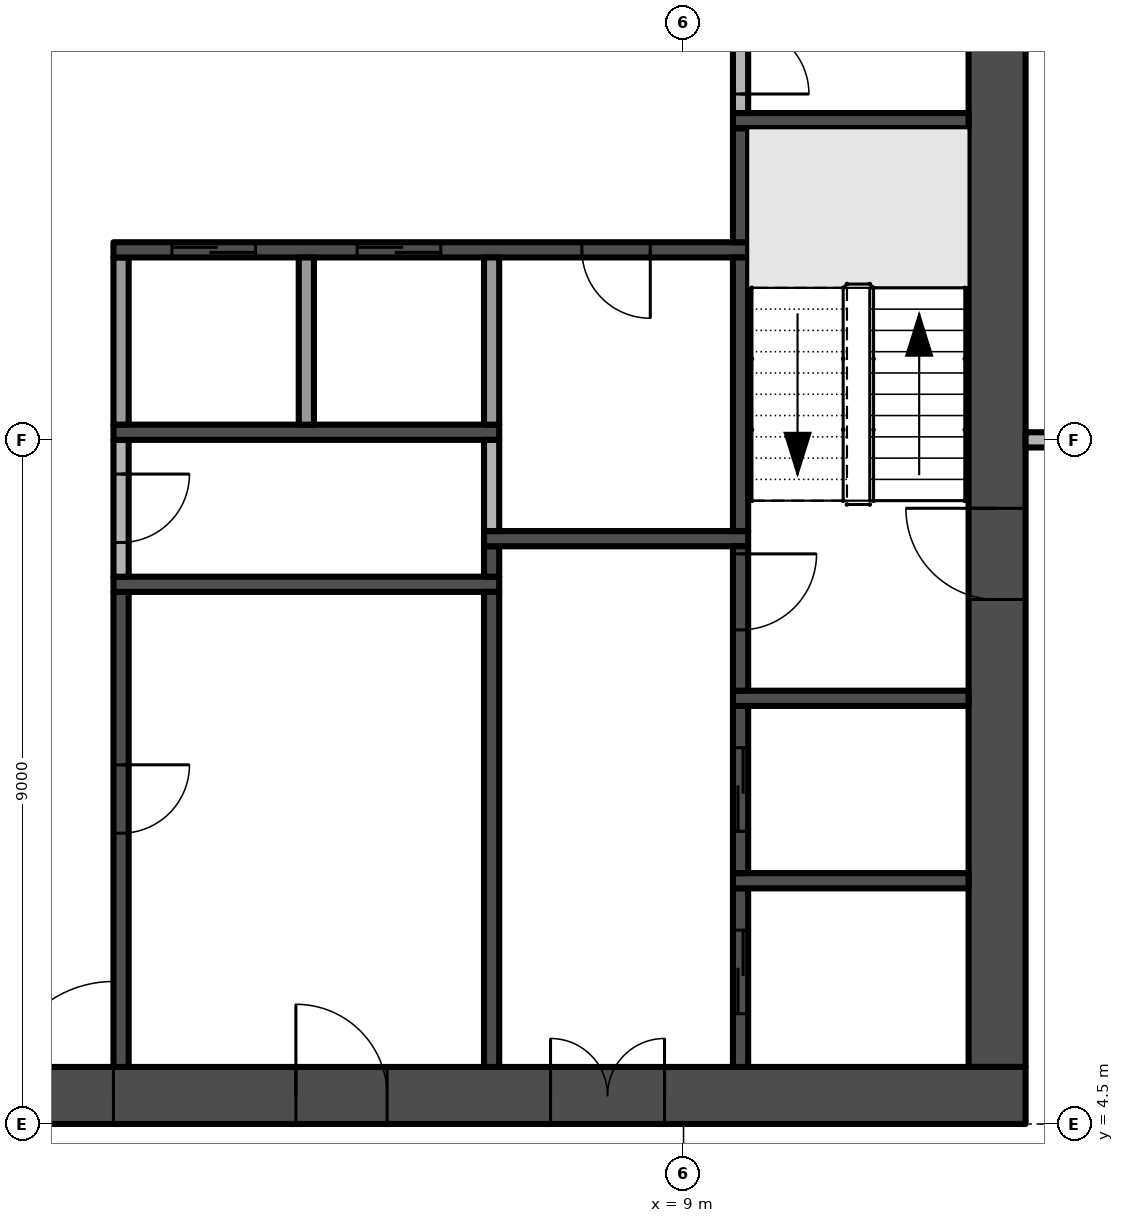
"""IFC4 building model, lengths in metres.
Left out: names, types, materials, properties, quantities, classifications, styles, units other than length and angle.
Written with IfcOpenShell. Run it as: python <this file> out.ifc"""

import sys

from ifc_helpers import new_model, si_unit, direction, frame, frame_2d, origin, place, context, subcontext, project, spatial, rectangle, extrude, element, fill, save


model = new_model("IFC4")
c1 = context("Model", 3, precision=1e-05, world=origin(), true_north=direction((0.0, 1.0)))
c2 = subcontext(c1, "Body", "Model", "MODEL_VIEW")
j1 = project(units=[si_unit("LENGTHUNIT", "METRE"), si_unit("PLANEANGLEUNIT", "RADIAN")], contexts=[c1])
p1 = place(None, origin())
s1 = spatial("IfcSite", under=j1, at=p1, CompositionType="ELEMENT")
p2 = place(p1, origin())
s2 = spatial("IfcBuilding", under=s1, at=p2, CompositionType="ELEMENT")
p3 = place(p2, frame((0.0, 0.0, 151.6)))
s3 = spatial("IfcBuildingStorey", under=s2, at=p3, CompositionType="ELEMENT", Elevation=151.6)
p4 = place(p3, frame((-13.5, 4.875, -0.3), z_axis=(0.0, 0.0, 1.0), x_axis=(1.0, 0.0, 0.0)))
e1 = element("IfcWall", 1, at=p4, inside=s3, PredefinedType="SHEAR", context=c2, shape_type="SweptSolid", body=[
    extrude(rectangle(XDim=27.0, YDim=0.75, at=frame_2d((13.5, 0.0))), origin(), (0.0, 0.0, 1.0), 3.8),
])
p5 = place(p4, frame((12.0, 0.0, 0.3)))
e2 = element("IfcOpeningElement", 2, at=p5, cuts=e1, PredefinedType="OPENING", context=c2, shape_type="SweptSolid", body=[
    extrude(rectangle(XDim=3.0, YDim=2.4, at=frame_2d((1.5, 1.2))), frame((0.0, 0.385, 0.0), z_axis=(0.0, -1.0, 0.0), x_axis=(1.0, 0.0, 0.0)), (0.0, 0.0, 1.0), 0.77),
])
p6 = place(p4, frame((4.9, 0.0, 0.3)))
e3 = element("IfcOpeningElement", 3, at=p6, cuts=e1, PredefinedType="OPENING", context=c2, shape_type="SweptSolid", body=[
    extrude(rectangle(XDim=1.2, YDim=2.2, at=frame_2d((0.6, 1.1))), frame((0.0, 0.385, 0.0), z_axis=(0.0, -1.0, 0.0), x_axis=(1.0, 0.0, 0.0)), (0.0, 0.0, 1.0), 0.77),
])
p7 = place(p4, frame((20.75, 0.0, 0.3)))
e4 = element("IfcOpeningElement", 4, at=p7, cuts=e1, PredefinedType="OPENING", context=c2, shape_type="SweptSolid", body=[
    extrude(rectangle(XDim=1.5, YDim=2.2, at=frame_2d((0.75, 1.1))), frame((0.0, 0.385, 0.0), z_axis=(0.0, -1.0, 0.0), x_axis=(1.0, 0.0, 0.0)), (0.0, 0.0, 1.0), 0.77),
])
p8 = place(p4, frame((17.4, 0.0, 0.3)))
e5 = element("IfcOpeningElement", 5, at=p8, cuts=e1, PredefinedType="OPENING", context=c2, shape_type="SweptSolid", body=[
    extrude(rectangle(XDim=1.2, YDim=2.2, at=frame_2d((0.6, 1.1))), frame((0.0, 0.385, 0.0), z_axis=(0.0, -1.0, 0.0), x_axis=(1.0, 0.0, 0.0)), (0.0, 0.0, 1.0), 0.77),
])
p9 = place(p3, frame((13.125, 5.25, -0.3), z_axis=(0.0, 0.0, 1.0), x_axis=(0.0, 1.0, 0.0)))
e6 = element("IfcWall", 6, at=p9, inside=s3, PredefinedType="SHEAR", context=c2, shape_type="SweptSolid", body=[
    extrude(rectangle(XDim=16.5, YDim=0.75, at=frame_2d((8.25, 0.0))), origin(), (0.0, 0.0, 1.0), 3.8),
])
p10 = place(p9, frame((6.15, 0.0, 0.3)))
e7 = element("IfcOpeningElement", 7, at=p10, cuts=e6, PredefinedType="OPENING", context=c2, shape_type="SweptSolid", body=[
    extrude(rectangle(XDim=1.2, YDim=2.2, at=frame_2d((0.6, 1.1))), frame((0.0, 0.385, 0.0), z_axis=(0.0, -1.0, 0.0), x_axis=(1.0, 0.0, 0.0)), (0.0, 0.0, 1.0), 0.77),
])
p11 = place(p3, frame((1.6, 11.5, 0.0), z_axis=(0.0, 0.0, 1.0), x_axis=(0.0, -1.0, 0.0)))
e8 = element("IfcWall", 8, at=p11, inside=s3, PredefinedType="SHEAR", context=c2, shape_type="SweptSolid", body=[
    extrude(rectangle(XDim=6.25, YDim=0.2, at=frame_2d((3.125, 0.0))), origin(), (0.0, 0.0, 1.0), 3.5),
])
p12 = place(p11, frame((2.275, 0.0, 0.0)))
e9 = element("IfcOpeningElement", 9, at=p12, cuts=e8, PredefinedType="OPENING", context=c2, shape_type="SweptSolid", body=[
    extrude(rectangle(XDim=0.9, YDim=2.1, at=frame_2d((0.45, 1.05))), frame((0.0, 0.11, 0.0), z_axis=(0.0, -1.0, 0.0), x_axis=(1.0, 0.0, 0.0)), (0.0, 0.0, 1.0), 0.22),
])
p13 = place(p3, frame((1.5, 11.6, 0.0), z_axis=(0.0, 0.0, 1.0), x_axis=(1.0, 0.0, 0.0)))
e10 = element("IfcWall", 10, at=p13, inside=s3, PredefinedType="SHEAR", context=c2, shape_type="SweptSolid", body=[
    extrude(rectangle(XDim=5.075, YDim=0.2, at=frame_2d((2.538, 0.0))), origin(), (0.0, 0.0, 1.0), 3.5),
])
p14 = place(p3, frame((1.6, 13.5, 0.0), z_axis=(0.0, 0.0, 1.0), x_axis=(0.0, -1.0, 0.0)))
e11 = element("IfcWall", 11, at=p14, inside=s3, PredefinedType="PARTITIONING", context=c2, shape_type="SweptSolid", body=[
    extrude(rectangle(XDim=1.8, YDim=0.2, at=frame_2d((0.9, 0.0))), origin(), (0.0, 0.0, 1.0), 3.5),
])
p15 = place(p14, frame((0.45, 0.0, 0.0)))
e12 = element("IfcOpeningElement", 12, at=p15, cuts=e11, PredefinedType="OPENING", context=c2, shape_type="SweptSolid", body=[
    extrude(rectangle(XDim=0.9, YDim=2.1, at=frame_2d((0.45, 1.05))), frame((0.0, 0.11, 0.0), z_axis=(0.0, -1.0, 0.0), x_axis=(1.0, 0.0, 0.0)), (0.0, 0.0, 1.0), 0.22),
])
p16 = place(p3, frame((1.5, 13.6, 0.0), z_axis=(0.0, 0.0, 1.0), x_axis=(1.0, 0.0, 0.0)))
e13 = element("IfcWall", 13, at=p16, inside=s3, PredefinedType="SHEAR", context=c2, shape_type="SweptSolid", body=[
    extrude(rectangle(XDim=5.075, YDim=0.2, at=frame_2d((2.538, 0.0))), origin(), (0.0, 0.0, 1.0), 3.5),
])
p17 = place(p3, frame((1.6, 13.7, 0.0), z_axis=(0.0, 0.0, 1.0), x_axis=(0.0, 1.0, 0.0)))
e14 = element("IfcWall", 14, at=p17, inside=s3, PredefinedType="PARTITIONING", context=c2, shape_type="SweptSolid", body=[
    extrude(rectangle(XDim=2.2, YDim=0.2, at=frame_2d((1.1, 0.0))), origin(), (0.0, 0.0, 1.0), 3.5),
])
p18 = place(p3, frame((9.85, 16.0, 0.0), z_axis=(0.0, 0.0, 1.0), x_axis=(-1.0, 0.0, 0.0)))
e15 = element("IfcWall", 15, at=p18, inside=s3, PredefinedType="SHEAR", context=c2, shape_type="SweptSolid", body=[
    extrude(rectangle(XDim=8.35, YDim=0.2, at=frame_2d((4.175, 0.0))), origin(), (0.0, 0.0, 1.0), 3.5),
])
p19 = place(p18, frame((6.481, 0.0, 0.0)))
e16 = element("IfcOpeningElement", 16, at=p19, cuts=e15, PredefinedType="OPENING", context=c2, shape_type="SweptSolid", body=[
    extrude(rectangle(XDim=1.1, YDim=2.1, at=frame_2d((0.55, 1.05))), frame((0.0, 0.11, 0.0), z_axis=(0.0, -1.0, 0.0), x_axis=(1.0, 0.0, 0.0)), (0.0, 0.0, 1.0), 0.22),
])
p20 = place(p18, frame((4.044, 0.0, 0.0)))
e17 = element("IfcOpeningElement", 17, at=p20, cuts=e15, PredefinedType="OPENING", context=c2, shape_type="SweptSolid", body=[
    extrude(rectangle(XDim=1.1, YDim=2.1, at=frame_2d((0.55, 1.05))), frame((0.0, 0.11, 0.0), z_axis=(0.0, -1.0, 0.0), x_axis=(1.0, 0.0, 0.0)), (0.0, 0.0, 1.0), 0.22),
])
p21 = place(p18, frame((1.288, 0.0, 0.0)))
e18 = element("IfcOpeningElement", 18, at=p21, cuts=e15, PredefinedType="OPENING", context=c2, shape_type="SweptSolid", body=[
    extrude(rectangle(XDim=0.9, YDim=2.1, at=frame_2d((0.45, 1.05))), frame((0.0, 0.11, 0.0), z_axis=(0.0, -1.0, 0.0), x_axis=(1.0, 0.0, 0.0)), (0.0, 0.0, 1.0), 0.22),
])
p22 = place(p3, frame((4.037, 13.7, 0.0), z_axis=(0.0, 0.0, 1.0), x_axis=(0.0, 1.0, 0.0)))
e19 = element("IfcWall", 19, at=p22, inside=s3, PredefinedType="PARTITIONING", context=c2, shape_type="SweptSolid", body=[
    extrude(rectangle(XDim=2.2, YDim=0.2, at=frame_2d((1.1, 0.0))), origin(), (0.0, 0.0, 1.0), 3.5),
])
p23 = place(p3, frame((6.475, 5.25, 0.0), z_axis=(0.0, 0.0, 1.0), x_axis=(0.0, 1.0, 0.0)))
e20 = element("IfcWall", 20, at=p23, inside=s3, PredefinedType="SHEAR", context=c2, shape_type="SweptSolid", body=[
    extrude(rectangle(XDim=6.25, YDim=0.2, at=frame_2d((3.125, 0.0))), origin(), (0.0, 0.0, 1.0), 3.5),
])
p24 = place(p3, frame((6.475, 11.7, 0.0), z_axis=(0.0, 0.0, 1.0), x_axis=(0.0, 1.0, 0.0)))
e21 = element("IfcWall", 21, at=p24, inside=s3, PredefinedType="SHEAR", context=c2, shape_type="SweptSolid", body=[
    extrude(rectangle(XDim=0.4, YDim=0.2, at=frame_2d((0.2, 0.0))), origin(), (0.0, 0.0, 1.0), 3.5),
])
p25 = place(p3, frame((6.375, 12.2, 0.0), z_axis=(0.0, 0.0, 1.0), x_axis=(1.0, 0.0, 0.0)))
e22 = element("IfcWall", 22, at=p25, inside=s3, PredefinedType="SHEAR", context=c2, shape_type="SweptSolid", body=[
    extrude(rectangle(XDim=3.475, YDim=0.2, at=frame_2d((1.738, 0.0))), origin(), (0.0, 0.0, 1.0), 3.5),
])
p26 = place(p3, frame((6.475, 12.3, 0.0), z_axis=(0.0, 0.0, 1.0), x_axis=(0.0, 1.0, 0.0)))
e23 = element("IfcWall", 23, at=p26, inside=s3, PredefinedType="PARTITIONING", context=c2, shape_type="SweptSolid", body=[
    extrude(rectangle(XDim=1.2, YDim=0.2, at=frame_2d((0.6, 0.0))), origin(), (0.0, 0.0, 1.0), 3.5),
])
p27 = place(p3, frame((6.475, 13.7, 0.0), z_axis=(0.0, 0.0, 1.0), x_axis=(0.0, 1.0, 0.0)))
e24 = element("IfcWall", 24, at=p27, inside=s3, PredefinedType="PARTITIONING", context=c2, shape_type="SweptSolid", body=[
    extrude(rectangle(XDim=2.2, YDim=0.2, at=frame_2d((1.1, 0.0))), origin(), (0.0, 0.0, 1.0), 3.5),
])
p28 = place(p3, frame((9.75, 5.25, 0.0), z_axis=(0.0, 0.0, 1.0), x_axis=(0.0, 1.0, 0.0)))
e25 = element("IfcWall", 25, at=p28, inside=s3, PredefinedType="SHEAR", context=c2, shape_type="SweptSolid", body=[
    extrude(rectangle(XDim=2.35, YDim=0.2, at=frame_2d((1.175, 0.0))), origin(), (0.0, 0.0, 1.0), 3.5),
])
p29 = place(p28, frame((0.7, 0.0, 0.0)))
e26 = element("IfcOpeningElement", 26, at=p29, cuts=e25, PredefinedType="OPENING", context=c2, shape_type="SweptSolid", body=[
    extrude(rectangle(XDim=1.1, YDim=2.1, at=frame_2d((0.55, 1.05))), frame((0.0, 0.11, 0.0), z_axis=(0.0, -1.0, 0.0), x_axis=(1.0, 0.0, 0.0)), (0.0, 0.0, 1.0), 0.22),
])
p30 = place(p3, frame((9.65, 7.7, 0.0), z_axis=(0.0, 0.0, 1.0), x_axis=(1.0, 0.0, 0.0)))
e27 = element("IfcWall", 27, at=p30, inside=s3, PredefinedType="SHEAR", context=c2, shape_type="SweptSolid", body=[
    extrude(rectangle(XDim=3.1, YDim=0.2, at=frame_2d((1.55, 0.0))), origin(), (0.0, 0.0, 1.0), 3.5),
])
p31 = place(p3, frame((9.75, 7.8, 0.0), z_axis=(0.0, 0.0, 1.0), x_axis=(0.0, 1.0, 0.0)))
e28 = element("IfcWall", 28, at=p31, inside=s3, PredefinedType="SHEAR", context=c2, shape_type="SweptSolid", body=[
    extrude(rectangle(XDim=2.2, YDim=0.2, at=frame_2d((1.1, 0.0))), origin(), (0.0, 0.0, 1.0), 3.5),
])
p32 = place(p31, frame((0.55, 0.0, 0.0)))
e29 = element("IfcOpeningElement", 29, at=p32, cuts=e28, PredefinedType="OPENING", context=c2, shape_type="SweptSolid", body=[
    extrude(rectangle(XDim=1.1, YDim=2.1, at=frame_2d((0.55, 1.05))), frame((0.0, 0.11, 0.0), z_axis=(0.0, -1.0, 0.0), x_axis=(1.0, 0.0, 0.0)), (0.0, 0.0, 1.0), 0.22),
])
p33 = place(p3, frame((9.65, 10.1, 0.0), z_axis=(0.0, 0.0, 1.0), x_axis=(1.0, 0.0, 0.0)))
e30 = element("IfcWall", 30, at=p33, inside=s3, PredefinedType="SHEAR", context=c2, shape_type="SweptSolid", body=[
    extrude(rectangle(XDim=3.1, YDim=0.2, at=frame_2d((1.55, 0.0))), origin(), (0.0, 0.0, 1.0), 3.5),
])
p34 = place(p3, frame((9.75, 12.1, 0.0), z_axis=(0.0, 0.0, 1.0), x_axis=(0.0, -1.0, 0.0)))
e31 = element("IfcWall", 31, at=p34, inside=s3, PredefinedType="SHEAR", context=c2, shape_type="SweptSolid", body=[
    extrude(rectangle(XDim=1.9, YDim=0.2, at=frame_2d((0.95, 0.0))), origin(), (0.0, 0.0, 1.0), 3.5),
])
p35 = place(p34, frame((0.1, 0.0, 0.0)))
e32 = element("IfcOpeningElement", 32, at=p35, cuts=e31, PredefinedType="OPENING", context=c2, shape_type="SweptSolid", body=[
    extrude(rectangle(XDim=1.0, YDim=2.2, at=frame_2d((0.5, 1.1))), frame((0.0, 0.11, 0.0), z_axis=(0.0, -1.0, 0.0), x_axis=(1.0, 0.0, 0.0)), (0.0, 0.0, 1.0), 0.22),
])
p36 = place(p3, frame((9.75, 12.3, 0.0), z_axis=(0.0, 0.0, 1.0), x_axis=(0.0, 1.0, 0.0)))
e33 = element("IfcWall", 33, at=p36, inside=s3, PredefinedType="SHEAR", context=c2, shape_type="SweptSolid", body=[
    extrude(rectangle(XDim=3.6, YDim=0.2, at=frame_2d((1.8, 0.0))), origin(), (0.0, 0.0, 1.0), 3.5),
])
p37 = place(p3, frame((9.75, 16.1, 0.0), z_axis=(0.0, 0.0, 1.0), x_axis=(0.0, 1.0, 0.0)))
e34 = element("IfcWall", 34, at=p37, inside=s3, PredefinedType="SHEAR", context=c2, shape_type="SweptSolid", body=[
    extrude(rectangle(XDim=1.5, YDim=0.2, at=frame_2d((0.75, 0.0))), origin(), (0.0, 0.0, 1.0), 3.5),
])
p38 = place(p3, frame((9.65, 17.7, 0.0), z_axis=(0.0, 0.0, 1.0), x_axis=(1.0, 0.0, 0.0)))
e35 = element("IfcWall", 35, at=p38, inside=s3, PredefinedType="SHEAR", context=c2, shape_type="SweptSolid", body=[
    extrude(rectangle(XDim=3.1, YDim=0.2, at=frame_2d((1.55, 0.0))), origin(), (0.0, 0.0, 1.0), 3.5),
])
p39 = place(p3, frame((9.75, 19.2, 0.0), z_axis=(0.0, 0.0, 1.0), x_axis=(0.0, -1.0, 0.0)))
e36 = element("IfcWall", 36, at=p39, inside=s3, PredefinedType="PARTITIONING", context=c2, shape_type="SweptSolid", body=[
    extrude(rectangle(XDim=1.4, YDim=0.2, at=frame_2d((0.7, 0.0))), origin(), (0.0, 0.0, 1.0), 3.5),
])
p40 = place(p39, frame((0.25, 0.0, 0.0)))
e37 = element("IfcOpeningElement", 37, at=p40, cuts=e36, PredefinedType="OPENING", context=c2, shape_type="SweptSolid", body=[
    extrude(rectangle(XDim=0.9, YDim=2.1, at=frame_2d((0.45, 1.05))), frame((0.0, 0.11, 0.0), z_axis=(0.0, -1.0, 0.0), x_axis=(1.0, 0.0, 0.0)), (0.0, 0.0, 1.0), 0.22),
])
p41 = place(p3, frame((13.5, 13.5, 0.0), z_axis=(0.0, 0.0, 1.0), x_axis=(1.0, 0.0, 0.0)))
e38 = element("IfcWall", 38, at=p41, inside=s3, PredefinedType="PARTITIONING", context=c2, shape_type="SweptSolid", body=[
    extrude(rectangle(XDim=3.875, YDim=0.2, at=frame_2d((1.938, 0.0))), origin(), (0.0, 0.0, 1.0), 3.5),
])
p42 = place(p41, frame((1.6, 0.0, 0.0)))
e39 = element("IfcOpeningElement", 39, at=p42, cuts=e38, PredefinedType="OPENING", context=c2, shape_type="SweptSolid", body=[
    extrude(rectangle(XDim=0.9, YDim=2.1, at=frame_2d((0.45, 1.05))), frame((0.0, 0.11, 0.0), z_axis=(0.0, -1.0, 0.0), x_axis=(1.0, 0.0, 0.0)), (0.0, 0.0, 1.0), 0.22),
])
p43 = place(p5, frame((3.0, 0.0, 0.0), z_axis=(0.0, 0.0, 1.0), x_axis=(-1.0, 0.0, 0.0)))
e40 = element("IfcDoor", 40, at=p43, inside=s3, OperationType="DOUBLE_DOOR_SINGLE_SWING", PredefinedType="DOOR", context=c2, shape_type="SweptSolid", body=[
    extrude(rectangle(XDim=3.0, YDim=2.4, at=frame_2d((1.5, 1.2))), frame((0.0, 0.025, 0.0), z_axis=(0.0, -1.0, 0.0), x_axis=(1.0, 0.0, 0.0)), (0.0, 0.0, 1.0), 0.05),
])
fill(e2, e40)
p44 = place(p10, frame((1.2, 0.0, 0.0), z_axis=(0.0, 0.0, 1.0), x_axis=(-1.0, 0.0, 0.0)))
e41 = element("IfcDoor", 41, at=p44, inside=s3, OperationType="SINGLE_SWING_LEFT", PredefinedType="DOOR", context=c2, shape_type="SweptSolid", body=[
    extrude(rectangle(XDim=1.2, YDim=2.2, at=frame_2d((0.6, 1.1))), frame((0.0, 0.025, 0.0), z_axis=(0.0, -1.0, 0.0), x_axis=(1.0, 0.0, 0.0)), (0.0, 0.0, 1.0), 0.05),
])
fill(e7, e41)
p45 = place(p7, frame((1.5, 0.0, 0.0), z_axis=(0.0, 0.0, 1.0), x_axis=(-1.0, 0.0, 0.0)))
e42 = element("IfcDoor", 42, at=p45, inside=s3, OperationType="DOUBLE_DOOR_SINGLE_SWING", PredefinedType="DOOR", context=c2, shape_type="SweptSolid", body=[
    extrude(rectangle(XDim=1.5, YDim=2.2, at=frame_2d((0.75, 1.1))), frame((0.0, 0.025, 0.0), z_axis=(0.0, -1.0, 0.0), x_axis=(1.0, 0.0, 0.0)), (0.0, 0.0, 1.0), 0.05),
])
fill(e4, e42)
p46 = place(p8, frame((1.2, 0.0, 0.0), z_axis=(0.0, 0.0, 1.0), x_axis=(-1.0, 0.0, 0.0)))
e43 = element("IfcDoor", 43, at=p46, inside=s3, OperationType="SINGLE_SWING_RIGHT", PredefinedType="DOOR", context=c2, shape_type="SweptSolid", body=[
    extrude(rectangle(XDim=1.2, YDim=2.2, at=frame_2d((0.6, 1.1))), frame((0.0, 0.025, 0.0), z_axis=(0.0, -1.0, 0.0), x_axis=(1.0, 0.0, 0.0)), (0.0, 0.0, 1.0), 0.05),
])
fill(e5, e43)
p47 = place(p35, origin())
e44 = element("IfcDoor", 44, at=p47, inside=s3, OperationType="SINGLE_SWING_LEFT", PredefinedType="DOOR", context=c2, shape_type="SweptSolid", body=[
    extrude(rectangle(XDim=1.0, YDim=2.2, at=frame_2d((0.5, 1.1))), frame((0.0, 0.025, 0.0), z_axis=(0.0, -1.0, 0.0), x_axis=(1.0, 0.0, 0.0)), (0.0, 0.0, 1.0), 0.05),
])
fill(e32, e44)
p48 = place(p19, origin())
e45 = element("IfcDoor", 45, at=p48, inside=s3, OperationType="SLIDING_TO_RIGHT", PredefinedType="DOOR", context=c2, shape_type="SweptSolid", body=[
    extrude(rectangle(XDim=1.1, YDim=2.1, at=frame_2d((0.55, 1.05))), frame((0.0, 0.025, 0.0), z_axis=(0.0, -1.0, 0.0), x_axis=(1.0, 0.0, 0.0)), (0.0, 0.0, 1.0), 0.05),
])
fill(e16, e45)
p49 = place(p20, origin())
e46 = element("IfcDoor", 46, at=p49, inside=s3, OperationType="SLIDING_TO_RIGHT", PredefinedType="DOOR", context=c2, shape_type="SweptSolid", body=[
    extrude(rectangle(XDim=1.1, YDim=2.1, at=frame_2d((0.55, 1.05))), frame((0.0, 0.025, 0.0), z_axis=(0.0, -1.0, 0.0), x_axis=(1.0, 0.0, 0.0)), (0.0, 0.0, 1.0), 0.05),
])
fill(e17, e46)
p50 = place(p29, origin())
e47 = element("IfcDoor", 47, at=p50, inside=s3, OperationType="SLIDING_TO_RIGHT", PredefinedType="DOOR", context=c2, shape_type="SweptSolid", body=[
    extrude(rectangle(XDim=1.1, YDim=2.1, at=frame_2d((0.55, 1.05))), frame((0.0, 0.025, 0.0), z_axis=(0.0, -1.0, 0.0), x_axis=(1.0, 0.0, 0.0)), (0.0, 0.0, 1.0), 0.05),
])
fill(e26, e47)
p51 = place(p32, origin())
e48 = element("IfcDoor", 48, at=p51, inside=s3, OperationType="SLIDING_TO_RIGHT", PredefinedType="DOOR", context=c2, shape_type="SweptSolid", body=[
    extrude(rectangle(XDim=1.1, YDim=2.1, at=frame_2d((0.55, 1.05))), frame((0.0, 0.025, 0.0), z_axis=(0.0, -1.0, 0.0), x_axis=(1.0, 0.0, 0.0)), (0.0, 0.0, 1.0), 0.05),
])
fill(e29, e48)
p52 = place(p12, origin())
e49 = element("IfcDoor", 49, at=p52, inside=s3, OperationType="SINGLE_SWING_LEFT", PredefinedType="DOOR", context=c2, shape_type="SweptSolid", body=[
    extrude(rectangle(XDim=0.9, YDim=2.1, at=frame_2d((0.45, 1.05))), frame((0.0, 0.025, 0.0), z_axis=(0.0, -1.0, 0.0), x_axis=(1.0, 0.0, 0.0)), (0.0, 0.0, 1.0), 0.05),
])
fill(e9, e49)
p53 = place(p15, origin())
e50 = element("IfcDoor", 50, at=p53, inside=s3, OperationType="SINGLE_SWING_LEFT", PredefinedType="DOOR", context=c2, shape_type="SweptSolid", body=[
    extrude(rectangle(XDim=0.9, YDim=2.1, at=frame_2d((0.45, 1.05))), frame((0.0, 0.025, 0.0), z_axis=(0.0, -1.0, 0.0), x_axis=(1.0, 0.0, 0.0)), (0.0, 0.0, 1.0), 0.05),
])
fill(e12, e50)
p54 = place(p21, origin())
e51 = element("IfcDoor", 51, at=p54, inside=s3, OperationType="SINGLE_SWING_LEFT", PredefinedType="DOOR", context=c2, shape_type="SweptSolid", body=[
    extrude(rectangle(XDim=0.9, YDim=2.1, at=frame_2d((0.45, 1.05))), frame((0.0, 0.025, 0.0), z_axis=(0.0, -1.0, 0.0), x_axis=(1.0, 0.0, 0.0)), (0.0, 0.0, 1.0), 0.05),
])
fill(e18, e51)
p55 = place(p40, origin())
e52 = element("IfcDoor", 52, at=p55, inside=s3, OperationType="SINGLE_SWING_RIGHT", PredefinedType="DOOR", context=c2, shape_type="SweptSolid", body=[
    extrude(rectangle(XDim=0.9, YDim=2.1, at=frame_2d((0.45, 1.05))), frame((0.0, 0.025, 0.0), z_axis=(0.0, -1.0, 0.0), x_axis=(1.0, 0.0, 0.0)), (0.0, 0.0, 1.0), 0.05),
])
fill(e37, e52)
save(model, sys.argv[1])
